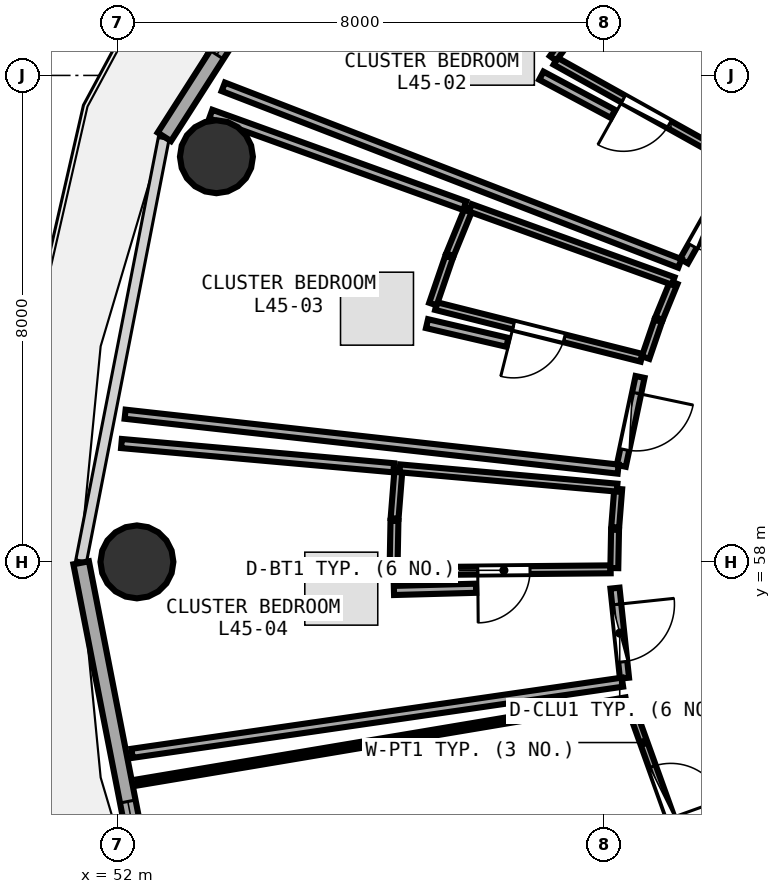
"""IFC4 building model, lengths in metres.
Left out: names, types, materials, properties, quantities, classifications, styles, units other than length and angle.
Written with IfcOpenShell. Run it as: python <this file> out.ifc"""

import sys

from ifc_helpers import new_model, si_unit, direction, frame, frame_2d, origin, origin_2d, place, context, subcontext, project, spatial, rectangle, circle, extrude, element, fill, save


model = new_model("IFC4")
c1 = context("Model", 3, precision=1e-05, world=origin(), true_north=direction((0.0, 1.0)))
c2 = subcontext(c1, "Body", "Model", "MODEL_VIEW")
j1 = project(units=[si_unit("LENGTHUNIT", "METRE"), si_unit("PLANEANGLEUNIT", "RADIAN")], contexts=[c1])
p1 = place(None, origin())
s1 = spatial("IfcSite", under=j1, at=p1, CompositionType="ELEMENT")
p2 = place(p1, origin())
s2 = spatial("IfcBuilding", under=s1, at=p2, CompositionType="ELEMENT")
p3 = place(p2, frame((0.0, 0.0, 176.85)))
s3 = spatial("IfcBuildingStorey", under=s2, at=p3, CompositionType="ELEMENT", Elevation=176.85)
for number, where, z_axis, x_axis in (
    (1, (53.627, 64.663, 0.0), (0.0, 0.0, 1.0), (1.0, 0.0, 0.0)),
    (2, (52.32, 58.0, 0.0), (0.0, 0.0, 1.0), (1.0, 0.0, 0.0)),
):
    element("IfcColumn", number, at=place(p3, frame(where, z_axis=z_axis, x_axis=x_axis)), inside=s3, PredefinedType="COLUMN", context=c2, shape_type="SweptSolid", body=[
        extrude(circle(Radius=0.6, at=origin_2d()), origin(), (0.0, 0.0, 1.0), 3.75),
    ])
p4 = place(p3, frame((56.679, 71.1, 0.0), z_axis=(0.0, 0.0, 1.0), x_axis=(-0.538801521808, -0.842432739213, 0.0)))
e3 = element("IfcWall", 3, at=p4, inside=s3, PredefinedType="SOLIDWALL", context=c2, shape_type="SweptSolid", body=[
    extrude(rectangle(XDim=7.253, YDim=0.26, at=frame_2d((3.627, 0.0))), origin(), (0.0, 0.0, 1.0), 3.475),
])
p5 = place(p4, frame((3.152, 0.0, 0.0)))
e4 = element("IfcOpeningElement", 4, at=p5, cuts=e3, PredefinedType="OPENING", context=c2, shape_type="SweptSolid", body=[
    extrude(rectangle(XDim=0.95, YDim=2.1, at=frame_2d((0.475, 1.05))), frame((0.0, 0.14, 0.0), z_axis=(0.0, -1.0, 0.0), x_axis=(1.0, 0.0, 0.0)), (0.0, 0.0, 1.0), 0.28),
])
p6 = place(p4, frame((4.452, 0.0, 0.85)))
e5 = element("IfcOpeningElement", 5, at=p6, cuts=e3, PredefinedType="OPENING", context=c2, shape_type="SweptSolid", body=[
    extrude(rectangle(XDim=1.2, YDim=1.45, at=frame_2d((0.6, 0.725))), frame((0.0, 0.14, 0.0), z_axis=(0.0, -1.0, 0.0), x_axis=(1.0, 0.0, 0.0)), (0.0, 0.0, 1.0), 0.28),
])
p7 = place(p3, frame((51.403, 57.985, 0.0), z_axis=(0.0, 0.0, 1.0), x_axis=(0.191716984769, -0.981450252306, 0.0)))
e6 = element("IfcWall", 6, at=p7, inside=s3, PredefinedType="SOLIDWALL", context=c2, shape_type="SweptSolid", body=[
    extrude(rectangle(XDim=7.079, YDim=0.26, at=frame_2d((3.54, 0.0))), origin(), (0.0, 0.0, 1.0), 3.475),
])
p8 = place(p7, frame((4.0, 0.0, 0.85)))
e7 = element("IfcOpeningElement", 7, at=p8, cuts=e6, PredefinedType="OPENING", context=c2, shape_type="SweptSolid", body=[
    extrude(rectangle(XDim=1.6, YDim=1.45, at=frame_2d((0.8, 0.725))), frame((0.0, 0.14, 0.0), z_axis=(0.0, -1.0, 0.0), x_axis=(1.0, 0.0, 0.0)), (0.0, 0.0, 1.0), 0.28),
])
p9 = place(p3, frame((62.188, 64.57, 0.0), z_axis=(0.0, 0.0, 1.0), x_axis=(-0.873255694646, 0.487262241271, 0.0)))
e8 = element("IfcWall", 8, at=p9, inside=s3, PredefinedType="PLUMBINGWALL", context=c2, shape_type="SweptSolid", body=[
    extrude(rectangle(XDim=3.416, YDim=0.13, at=frame_2d((1.708, 0.0))), origin(), (0.0, 0.0, 1.0), 2.975),
])
p10 = place(p9, frame((1.278, 0.0, 0.0)))
e9 = element("IfcOpeningElement", 9, at=p10, cuts=e8, PredefinedType="OPENING", context=c2, shape_type="SweptSolid", body=[
    extrude(rectangle(XDim=0.86, YDim=2.05, at=frame_2d((0.43, 1.025))), frame((0.0, 0.075, 0.0), z_axis=(0.0, -1.0, 0.0), x_axis=(1.0, 0.0, 0.0)), (0.0, 0.0, 1.0), 0.15),
])
p11 = place(p3, frame((62.066, 64.275, 0.0), z_axis=(0.0, 0.0, 1.0), x_axis=(-0.491582624537, -0.870830938388, 0.0)))
e10 = element("IfcWall", 10, at=p11, inside=s3, PredefinedType="PARTITIONING", context=c2, shape_type="SweptSolid", body=[
    extrude(rectangle(XDim=1.526, YDim=0.15, at=frame_2d((0.763, 0.0))), origin(), (0.0, 0.0, 1.0), 3.235),
])
p12 = place(p11, frame((0.288, 0.0, 0.0)))
e11 = element("IfcOpeningElement", 11, at=p12, cuts=e10, PredefinedType="OPENING", context=c2, shape_type="SweptSolid", body=[
    extrude(rectangle(XDim=0.95, YDim=2.08, at=frame_2d((0.475, 1.04))), frame((0.0, 0.085, 0.0), z_axis=(0.0, -1.0, 0.0), x_axis=(1.0, 0.0, 0.0)), (0.0, 0.0, 1.0), 0.17),
])
p13 = place(p3, frame((60.621, 61.356, 0.0), z_axis=(0.0, 0.0, 1.0), x_axis=(-0.969774737706, 0.244001963326, 0.0)))
e12 = element("IfcWall", 12, at=p13, inside=s3, PredefinedType="PLUMBINGWALL", context=c2, shape_type="SweptSolid", body=[
    extrude(rectangle(XDim=3.486, YDim=0.13, at=frame_2d((1.743, 0.0))), origin(), (0.0, 0.0, 1.0), 3.175),
])
p14 = place(p13, frame((1.313, 0.0, 0.0)))
e13 = element("IfcOpeningElement", 13, at=p14, cuts=e12, PredefinedType="OPENING", context=c2, shape_type="SweptSolid", body=[
    extrude(rectangle(XDim=0.86, YDim=2.05, at=frame_2d((0.43, 1.025))), frame((0.0, 0.075, 0.0), z_axis=(0.0, -1.0, 0.0), x_axis=(1.0, 0.0, 0.0)), (0.0, 0.0, 1.0), 0.15),
])
p15 = place(p3, frame((60.594, 61.041, 0.0), z_axis=(0.0, 0.0, 1.0), x_axis=(-0.206257580925, -0.978497731378, 0.0)))
e14 = element("IfcWall", 14, at=p15, inside=s3, PredefinedType="PARTITIONING", context=c2, shape_type="SweptSolid", body=[
    extrude(rectangle(XDim=1.494, YDim=0.15, at=frame_2d((0.747, 0.0))), origin(), (0.0, 0.0, 1.0), 3.48),
])
p16 = place(p15, frame((0.272, 0.0, 0.0)))
e15 = element("IfcOpeningElement", 15, at=p16, cuts=e14, PredefinedType="OPENING", context=c2, shape_type="SweptSolid", body=[
    extrude(rectangle(XDim=0.95, YDim=2.08, at=frame_2d((0.475, 1.04))), frame((0.0, 0.085, 0.0), z_axis=(0.0, -1.0, 0.0), x_axis=(1.0, 0.0, 0.0)), (0.0, 0.0, 1.0), 0.17),
])
p17 = place(p3, frame((60.111, 57.877, 0.0), z_axis=(0.0, 0.0, 1.0), x_axis=(-0.999958513443, -0.009108863449, 0.0)))
e16 = element("IfcWall", 16, at=p17, inside=s3, PredefinedType="PLUMBINGWALL", context=c2, shape_type="SweptSolid", body=[
    extrude(rectangle(XDim=3.511, YDim=0.13, at=frame_2d((1.756, 0.0))), origin(), (0.0, 0.0, 1.0), 2.975),
])
p18 = place(p17, frame((1.326, 0.0, 0.0)))
e17 = element("IfcOpeningElement", 17, at=p18, cuts=e16, PredefinedType="OPENING", context=c2, shape_type="SweptSolid", body=[
    extrude(rectangle(XDim=0.86, YDim=2.05, at=frame_2d((0.43, 1.025))), frame((0.0, 0.075, 0.0), z_axis=(0.0, -1.0, 0.0), x_axis=(1.0, 0.0, 0.0)), (0.0, 0.0, 1.0), 0.15),
])
p19 = place(p3, frame((60.182, 57.568, 0.0), z_axis=(0.0, 0.0, 1.0), x_axis=(0.104940843895, -0.994478465972, 0.0)))
e18 = element("IfcWall", 18, at=p19, inside=s3, PredefinedType="PARTITIONING", context=c2, shape_type="SweptSolid", body=[
    extrude(rectangle(XDim=1.489, YDim=0.15, at=frame_2d((0.745, 0.0))), origin(), (0.0, 0.0, 1.0), 3.48),
])
p20 = place(p19, frame((0.269, 0.0, 0.0)))
e19 = element("IfcOpeningElement", 19, at=p20, cuts=e18, PredefinedType="OPENING", context=c2, shape_type="SweptSolid", body=[
    extrude(rectangle(XDim=0.95, YDim=2.08, at=frame_2d((0.475, 1.04))), frame((0.0, 0.085, 0.0), z_axis=(0.0, -1.0, 0.0), x_axis=(1.0, 0.0, 0.0)), (0.0, 0.0, 1.0), 0.17),
])
p21 = place(p3, frame((60.423, 55.673, 0.0), z_axis=(0.0, 0.0, 1.0), x_axis=(0.338221551274, -0.941066513193, 0.0)))
e20 = element("IfcWall", 20, at=p21, inside=s3, PredefinedType="PARTITIONING", context=c2, shape_type="SweptSolid", body=[
    extrude(rectangle(XDim=3.108, YDim=0.12, at=frame_2d((1.554, 0.0))), origin(), (0.0, 0.0, 1.0), 3.235),
])
p22 = place(p21, frame((1.104, 0.0, 0.0)))
e21 = element("IfcOpeningElement", 21, at=p22, cuts=e20, PredefinedType="OPENING", context=c2, shape_type="SweptSolid", body=[
    extrude(rectangle(XDim=0.9, YDim=2.08, at=frame_2d((0.45, 1.04))), frame((0.0, 0.07, 0.0), z_axis=(0.0, -1.0, 0.0), x_axis=(1.0, 0.0, 0.0)), (0.0, 0.0, 1.0), 0.14),
])
p23 = place(p3, frame((63.272, 65.904, 0.0), z_axis=(0.0, 0.0, 1.0), x_axis=(-0.803728632682, 0.594996037808, 0.0)))
e22 = element("IfcWall", 22, at=p23, inside=s3, PredefinedType="PARTITIONING", context=c2, shape_type="SweptSolid", body=[
    extrude(rectangle(XDim=6.886, YDim=0.15, at=frame_2d((3.443, 0.0))), origin(), (0.0, 0.0, 1.0), 3.175),
])
p24 = place(p3, frame((59.164, 66.28, 0.0), z_axis=(0.0, 0.0, 1.0), x_axis=(0.589885116714, 0.807487181991, 0.0)))
e23 = element("IfcWall", 23, at=p24, inside=s3, PredefinedType="PLUMBINGWALL", context=c2, shape_type="SweptSolid", body=[
    extrude(rectangle(XDim=0.838, YDim=0.13, at=frame_2d((0.419, 0.0))), origin(), (0.0, 0.0, 1.0), 3.48),
])
p25 = place(p3, frame((60.246, 67.646, 0.0), z_axis=(0.0, 0.0, 1.0), x_axis=(0.817907250539, -0.575350093, 0.0)))
e24 = element("IfcWall", 24, at=p25, inside=s3, PredefinedType="PLUMBINGWALL", context=c2, shape_type="SweptSolid", body=[
    extrude(rectangle(XDim=3.46, YDim=0.13, at=frame_2d((1.73, 0.0))), origin(), (0.0, 0.0, 1.0), 3.175),
])
p26 = place(p3, frame((61.25, 62.908, 0.0), z_axis=(0.0, 0.0, 1.0), x_axis=(-0.932687580633, 0.360685287936, 0.0)))
e25 = element("IfcWall", 25, at=p26, inside=s3, PredefinedType="PARTITIONING", context=c2, shape_type="SweptSolid", body=[
    extrude(rectangle(XDim=8.052, YDim=0.15, at=frame_2d((4.026, 0.0))), origin(), (0.0, 0.0, 1.0), 2.975),
])
p27 = place(p3, frame((58.971, 65.996, 0.0), z_axis=(0.0, 0.0, 1.0), x_axis=(0.882039066957, -0.471176277376, 0.0)))
e26 = element("IfcWall", 26, at=p27, inside=s3, PredefinedType="PARTITIONING", context=c2, shape_type="SweptSolid", body=[
    extrude(rectangle(XDim=1.336, YDim=0.15, at=frame_2d((0.668, 0.0))), origin(), (0.0, 0.0, 1.0), 3.175),
])
p28 = place(p3, frame((61.15, 62.594, 0.0), z_axis=(0.0, 0.0, 1.0), x_axis=(-0.38036677213, -0.924835725229, 0.0)))
e27 = element("IfcWall", 27, at=p28, inside=s3, PredefinedType="PLUMBINGWALL", context=c2, shape_type="SweptSolid", body=[
    extrude(rectangle(XDim=0.641, YDim=0.13, at=frame_2d((0.321, 0.0))), origin(), (0.0, 0.0, 1.0), 3.235),
])
p29 = place(p3, frame((60.893, 61.964, 0.0), z_axis=(0.0, 0.0, 1.0), x_axis=(-0.324128876048, -0.94601293422, 0.0)))
e28 = element("IfcWall", 28, at=p29, inside=s3, PredefinedType="PLUMBINGWALL", context=c2, shape_type="SweptSolid", body=[
    extrude(rectangle(XDim=0.639, YDim=0.13, at=frame_2d((0.319, 0.0))), origin(), (0.0, 0.0, 1.0), 3.48),
])
p30 = place(p3, frame((57.188, 62.24, 0.0), z_axis=(0.0, 0.0, 1.0), x_axis=(0.324370140969, 0.945930236142, 0.0)))
e29 = element("IfcWall", 29, at=p30, inside=s3, PredefinedType="PLUMBINGWALL", context=c2, shape_type="SweptSolid", body=[
    extrude(rectangle(XDim=0.817, YDim=0.13, at=frame_2d((0.409, 0.0))), origin(), (0.0, 0.0, 1.0), 3.48),
])
p31 = place(p3, frame((57.468, 63.051, 0.0), z_axis=(0.0, 0.0, 1.0), x_axis=(0.378505488692, 0.92559904658, 0.0)))
e30 = element("IfcWall", 30, at=p31, inside=s3, PredefinedType="PLUMBINGWALL", context=c2, shape_type="SweptSolid", body=[
    extrude(rectangle(XDim=0.821, YDim=0.13, at=frame_2d((0.411, 0.0))), origin(), (0.0, 0.0, 1.0), 3.48),
])
p32 = place(p3, frame((57.805, 63.822, 0.0), z_axis=(0.0, 0.0, 1.0), x_axis=(0.940709042882, -0.339214528935, 0.0)))
e31 = element("IfcWall", 31, at=p32, inside=s3, PredefinedType="PLUMBINGWALL", context=c2, shape_type="SweptSolid", body=[
    extrude(rectangle(XDim=3.545, YDim=0.13, at=frame_2d((1.772, 0.0))), origin(), (0.0, 0.0, 1.0), 3.175),
])
p33 = place(p3, frame((60.234, 59.525, 0.0), z_axis=(0.0, 0.0, 1.0), x_axis=(-0.99385157858, 0.110720548017, 0.0)))
e32 = element("IfcWall", 32, at=p33, inside=s3, PredefinedType="PARTITIONING", context=c2, shape_type="SweptSolid", body=[
    extrude(rectangle(XDim=8.158, YDim=0.15, at=frame_2d((4.079, 0.0))), origin(), (0.0, 0.0, 1.0), 3.025),
])
p34 = place(p3, frame((53.535, 65.365, 0.0), z_axis=(0.0, 0.0, 1.0), x_axis=(0.940657292565, -0.339358008517, 0.0)))
e33 = element("IfcWall", 33, at=p34, inside=s3, PredefinedType="PARTITIONING", context=c2, shape_type="SweptSolid", body=[
    extrude(rectangle(XDim=4.44, YDim=0.15, at=frame_2d((2.22, 0.0))), origin(), (0.0, 0.0, 1.0), 2.975),
])
p35 = place(p3, frame((57.091, 61.918, 0.0), z_axis=(0.0, 0.0, 1.0), x_axis=(0.973980333704, -0.226632543023, 0.0)))
e34 = element("IfcWall", 34, at=p35, inside=s3, PredefinedType="PARTITIONING", context=c2, shape_type="SweptSolid", body=[
    extrude(rectangle(XDim=1.357, YDim=0.15, at=frame_2d((0.679, 0.0))), origin(), (0.0, 0.0, 1.0), 3.175),
])
p36 = place(p3, frame((60.235, 59.199, 0.0), z_axis=(0.0, 0.0, 1.0), x_axis=(-0.078763069799, -0.996893363824, 0.0)))
e35 = element("IfcWall", 35, at=p36, inside=s3, PredefinedType="PLUMBINGWALL", context=c2, shape_type="SweptSolid", body=[
    extrude(rectangle(XDim=0.632, YDim=0.13, at=frame_2d((0.316, 0.0))), origin(), (0.0, 0.0, 1.0), 3.48),
])
p37 = place(p3, frame((60.184, 58.529, 0.0), z_axis=(0.0, 0.0, 1.0), x_axis=(-0.019338742534, -0.999812989032, 0.0)))
e36 = element("IfcWall", 36, at=p37, inside=s3, PredefinedType="PLUMBINGWALL", context=c2, shape_type="SweptSolid", body=[
    extrude(rectangle(XDim=0.631, YDim=0.13, at=frame_2d((0.315, 0.0))), origin(), (0.0, 0.0, 1.0), 2.975),
])
p38 = place(p3, frame((56.54, 57.865, 0.0), z_axis=(0.0, 0.0, 1.0), x_axis=(0.019006825377, 0.999819353978, 0.0)))
e37 = element("IfcWall", 37, at=p38, inside=s3, PredefinedType="PLUMBINGWALL", context=c2, shape_type="SweptSolid", body=[
    extrude(rectangle(XDim=0.809, YDim=0.13, at=frame_2d((0.405, 0.0))), origin(), (0.0, 0.0, 1.0), 2.975),
])
p39 = place(p3, frame((56.558, 58.714, 0.0), z_axis=(0.0, 0.0, 1.0), x_axis=(0.078797232985, 0.996890664052, 0.0)))
e38 = element("IfcWall", 38, at=p39, inside=s3, PredefinedType="PLUMBINGWALL", context=c2, shape_type="SweptSolid", body=[
    extrude(rectangle(XDim=0.809, YDim=0.13, at=frame_2d((0.404, 0.0))), origin(), (0.0, 0.0, 1.0), 3.48),
])
p40 = place(p3, frame((56.643, 59.538, 0.0), z_axis=(0.0, 0.0, 1.0), x_axis=(0.99608063721, -0.088449783359, 0.0)))
e39 = element("IfcWall", 39, at=p40, inside=s3, PredefinedType="PLUMBINGWALL", context=c2, shape_type="SweptSolid", body=[
    extrude(rectangle(XDim=3.588, YDim=0.13, at=frame_2d((1.794, 0.0))), origin(), (0.0, 0.0, 1.0), 3.175),
])
p41 = place(p3, frame((60.305, 56.022, 0.0), z_axis=(0.0, 0.0, 1.0), x_axis=(-0.989635565405, -0.143601698061, 0.0)))
e40 = element("IfcWall", 40, at=p41, inside=s3, PredefinedType="PARTITIONING", context=c2, shape_type="SweptSolid", body=[
    extrude(rectangle(XDim=8.15, YDim=0.15, at=frame_2d((4.075, 0.0))), origin(), (0.0, 0.0, 1.0), 3.025),
])
p42 = place(p3, frame((52.066, 59.947, 0.0), z_axis=(0.0, 0.0, 1.0), x_axis=(0.996054097512, -0.088748153952, 0.0)))
e41 = element("IfcWall", 41, at=p42, inside=s3, PredefinedType="PARTITIONING", context=c2, shape_type="SweptSolid", body=[
    extrude(rectangle(XDim=4.495, YDim=0.15, at=frame_2d((2.248, 0.0))), origin(), (0.0, 0.0, 1.0), 3.025),
])
p43 = place(p3, frame((56.547, 57.53, 0.0), z_axis=(0.0, 0.0, 1.0), x_axis=(0.999637471643, 0.026924436601, 0.0)))
e42 = element("IfcWall", 42, at=p43, inside=s3, PredefinedType="PARTITIONING", context=c2, shape_type="SweptSolid", body=[
    extrude(rectangle(XDim=1.351, YDim=0.15, at=frame_2d((0.676, 0.0))), origin(), (0.0, 0.0, 1.0), 3.175),
])
p44 = place(p3, frame((52.331, 54.374, 0.0), z_axis=(0.0, 0.0, 1.0), x_axis=(0.986190638786, 0.165614081438, 0.0)))
e43 = element("IfcWall", 43, at=p44, inside=s3, PredefinedType="PARTITIONING", context=c2, shape_type="SweptSolid", body=[
    extrude(rectangle(XDim=8.145, YDim=0.1, at=frame_2d((4.072, 0.0))), origin(), (0.0, 0.0, 1.0), 3.025),
])
p45 = place(p6, origin())
e44 = element("IfcWindow", 44, at=p45, inside=s3, PartitioningType="SINGLE_PANEL", PredefinedType="WINDOW", context=c2, shape_type="SweptSolid", body=[
    extrude(rectangle(XDim=1.2, YDim=1.45, at=frame_2d((0.6, 0.725))), frame((0.0, 0.03, 0.0), z_axis=(0.0, -1.0, 0.0), x_axis=(1.0, 0.0, 0.0)), (0.0, 0.0, 1.0), 0.06),
])
fill(e5, e44)
p46 = place(p8, origin())
e45 = element("IfcWindow", 45, at=p46, inside=s3, PartitioningType="SINGLE_PANEL", PredefinedType="WINDOW", context=c2, shape_type="SweptSolid", body=[
    extrude(rectangle(XDim=1.6, YDim=1.45, at=frame_2d((0.8, 0.725))), frame((0.0, 0.03, 0.0), z_axis=(0.0, -1.0, 0.0), x_axis=(1.0, 0.0, 0.0)), (0.0, 0.0, 1.0), 0.06),
])
fill(e7, e45)
p47 = place(p10, origin())
e46 = element("IfcDoor", 46, at=p47, inside=s3, OperationType="SINGLE_SWING_RIGHT", PredefinedType="DOOR", context=c2, shape_type="SweptSolid", body=[
    extrude(rectangle(XDim=0.86, YDim=2.05, at=frame_2d((0.43, 1.025))), frame((0.0, 0.025, 0.0), z_axis=(0.0, -1.0, 0.0), x_axis=(1.0, 0.0, 0.0)), (0.0, 0.0, 1.0), 0.05),
])
fill(e9, e46)
p48 = place(p12, origin())
e47 = element("IfcDoor", 47, at=p48, inside=s3, OperationType="SINGLE_SWING_LEFT", PredefinedType="DOOR", context=c2, shape_type="SweptSolid", body=[
    extrude(rectangle(XDim=0.95, YDim=2.08, at=frame_2d((0.475, 1.04))), frame((0.0, 0.025, 0.0), z_axis=(0.0, -1.0, 0.0), x_axis=(1.0, 0.0, 0.0)), (0.0, 0.0, 1.0), 0.05),
])
fill(e11, e47)
p49 = place(p14, origin())
e48 = element("IfcDoor", 48, at=p49, inside=s3, OperationType="SINGLE_SWING_RIGHT", PredefinedType="DOOR", context=c2, shape_type="SweptSolid", body=[
    extrude(rectangle(XDim=0.86, YDim=2.05, at=frame_2d((0.43, 1.025))), frame((0.0, 0.025, 0.0), z_axis=(0.0, -1.0, 0.0), x_axis=(1.0, 0.0, 0.0)), (0.0, 0.0, 1.0), 0.05),
])
fill(e13, e48)
p50 = place(p16, origin())
e49 = element("IfcDoor", 49, at=p50, inside=s3, OperationType="SINGLE_SWING_LEFT", PredefinedType="DOOR", context=c2, shape_type="SweptSolid", body=[
    extrude(rectangle(XDim=0.95, YDim=2.08, at=frame_2d((0.475, 1.04))), frame((0.0, 0.025, 0.0), z_axis=(0.0, -1.0, 0.0), x_axis=(1.0, 0.0, 0.0)), (0.0, 0.0, 1.0), 0.05),
])
fill(e15, e49)
p51 = place(p18, origin())
e50 = element("IfcDoor", 50, at=p51, inside=s3, OperationType="SINGLE_SWING_RIGHT", PredefinedType="DOOR", context=c2, shape_type="SweptSolid", body=[
    extrude(rectangle(XDim=0.86, YDim=2.05, at=frame_2d((0.43, 1.025))), frame((0.0, 0.025, 0.0), z_axis=(0.0, -1.0, 0.0), x_axis=(1.0, 0.0, 0.0)), (0.0, 0.0, 1.0), 0.05),
])
fill(e17, e50)
p52 = place(p20, origin())
e51 = element("IfcDoor", 51, at=p52, inside=s3, OperationType="SINGLE_SWING_LEFT", PredefinedType="DOOR", context=c2, shape_type="SweptSolid", body=[
    extrude(rectangle(XDim=0.95, YDim=2.08, at=frame_2d((0.475, 1.04))), frame((0.0, 0.025, 0.0), z_axis=(0.0, -1.0, 0.0), x_axis=(1.0, 0.0, 0.0)), (0.0, 0.0, 1.0), 0.05),
])
fill(e19, e51)
p53 = place(p22, origin())
e52 = element("IfcDoor", 52, at=p53, inside=s3, OperationType="SINGLE_SWING_RIGHT", PredefinedType="DOOR", context=c2, shape_type="SweptSolid", body=[
    extrude(rectangle(XDim=0.9, YDim=2.08, at=frame_2d((0.45, 1.04))), frame((0.0, 0.025, 0.0), z_axis=(0.0, -1.0, 0.0), x_axis=(1.0, 0.0, 0.0)), (0.0, 0.0, 1.0), 0.05),
])
fill(e21, e52)
save(model, sys.argv[1])
